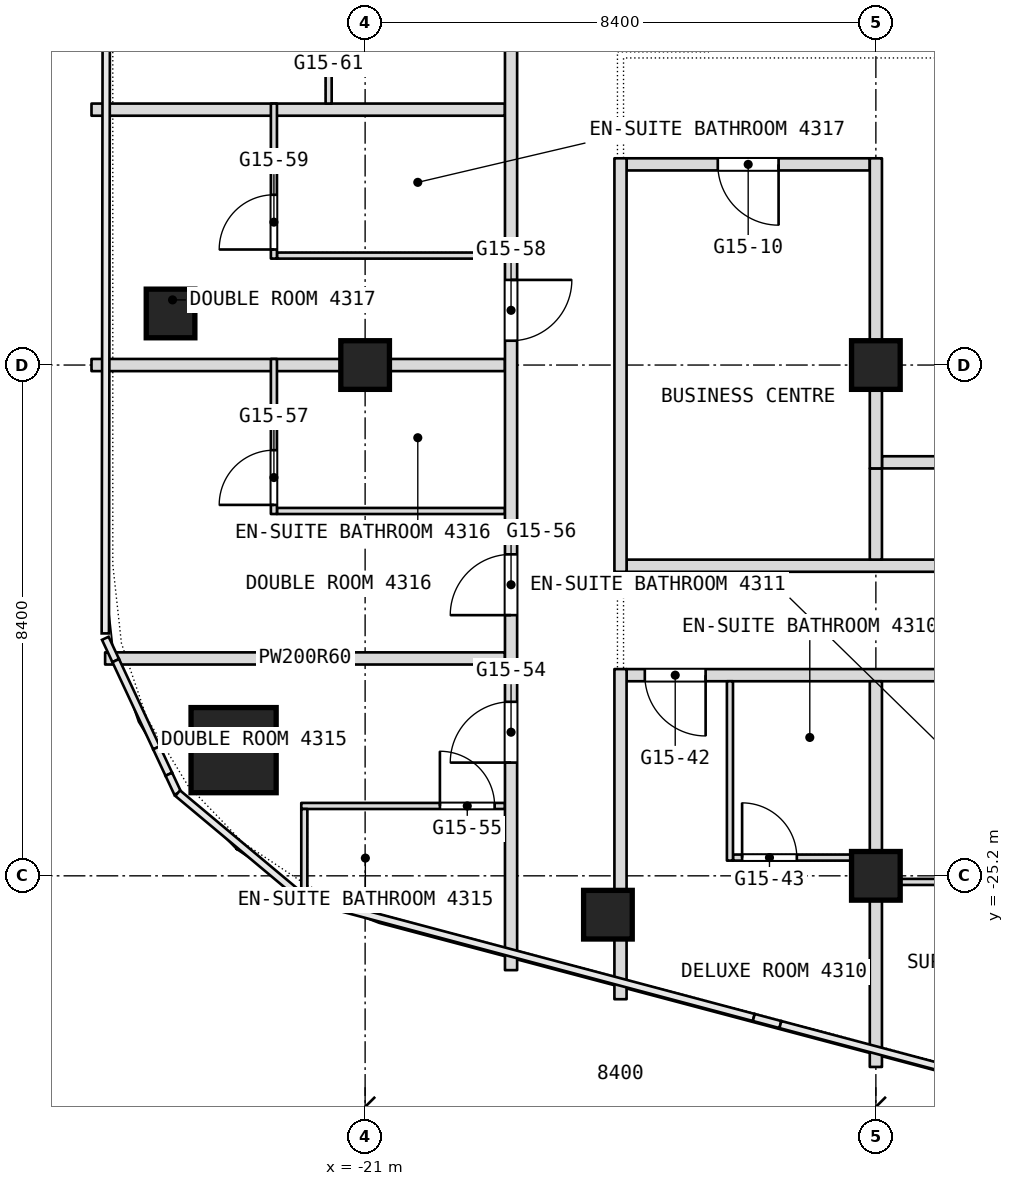
"""IFC4 building model, lengths in metres.
Left out: names, types, materials, properties, quantities, classifications, styles, units other than length and angle.
Written with IfcOpenShell. Run it as: python <this file> out.ifc"""

import sys

from ifc_helpers import new_model, si_unit, direction, frame, frame_2d, origin, origin_2d, place, context, subcontext, project, spatial, rectangle, extrude, element, fill, save


model = new_model("IFC4")
c1 = context("Model", 3, precision=1e-05, world=origin(), true_north=direction((0.0, 1.0)))
c2 = subcontext(c1, "Body", "Model", "MODEL_VIEW")
j1 = project(units=[si_unit("LENGTHUNIT", "METRE"), si_unit("PLANEANGLEUNIT", "RADIAN")], contexts=[c1])
p1 = place(None, origin())
s1 = spatial("IfcSite", under=j1, at=p1, CompositionType="ELEMENT")
p2 = place(p1, origin())
s2 = spatial("IfcBuilding", under=s1, at=p2, CompositionType="ELEMENT")
p3 = place(p2, frame((0.0, 0.0, 191.3)))
s3 = spatial("IfcBuildingStorey", under=s2, at=p3, CompositionType="ELEMENT", Elevation=191.3)
p4 = place(p3, frame((-23.163, -23.133, 0.0), z_axis=(0.0, 0.0, 1.0), x_axis=(1.0, 0.0, 0.0)))
e1 = element("IfcColumn", 1, at=p4, inside=s3, PredefinedType="COLUMN", context=c2, shape_type="SweptSolid", body=[
    extrude(rectangle(XDim=1.4, YDim=1.4, at=origin_2d()), origin(), (0.0, 0.0, 1.0), 3.6),
])
for number, where, z_axis, x_axis in (
    (2, (-21.0, -16.8, 0.0), (0.0, 0.0, 1.0), (1.0, 0.0, 0.0)),
    (3, (-12.6, -25.2, 0.0), (0.0, 0.0, 1.0), (1.0, 0.0, 0.0)),
    (4, (-12.6, -16.8, 0.0), (0.0, 0.0, 1.0), (1.0, 0.0, 0.0)),
    (5, (-24.2, -15.952, 0.0), (0.0, 0.0, 1.0), (1.0, 0.0, 0.0)),
    (6, (-17.007, -25.839, 0.0), (0.0, 0.0, 1.0), (1.0, 0.0, 0.0)),
):
    element("IfcColumn", number, at=place(p3, frame(where, z_axis=z_axis, x_axis=x_axis)), inside=s3, PredefinedType="COLUMN", context=c2, shape_type="SweptSolid", body=[
        extrude(rectangle(XDim=0.8, YDim=0.8, at=origin_2d()), origin(), (0.0, 0.0, 1.0), 3.6),
    ])
p5 = place(p3, frame((-12.5, -25.3, 0.0), z_axis=(0.0, 0.0, 1.0), x_axis=(1.0, 0.0, 0.0)))
e7 = element("IfcWall", 7, at=p5, inside=s3, PredefinedType="PARTITIONING", context=c2, shape_type="SweptSolid", body=[
    extrude(rectangle(XDim=2.35, YDim=0.1, at=frame_2d((1.175, 0.0))), origin(), (0.0, 0.0, 1.0), 2.94),
])
p6 = place(p5, frame((1.3, 0.0, 0.0)))
e8 = element("IfcOpeningElement", 8, at=p6, cuts=e7, PredefinedType="OPENING", context=c2, shape_type="SweptSolid", body=[
    extrude(rectangle(XDim=0.9, YDim=2.1, at=frame_2d((0.45, 1.05))), frame((0.0, 0.05, 0.0), z_axis=(0.0, -1.0, 0.0), x_axis=(1.0, 0.0, 0.0)), (0.0, 0.0, 1.0), 0.1),
])
p7 = place(p3, frame((-14.95, -24.9, 0.0), z_axis=(0.0, 0.0, 1.0), x_axis=(1.0, 0.0, 0.0)))
e9 = element("IfcWall", 9, at=p7, inside=s3, PredefinedType="PARTITIONING", context=c2, shape_type="SweptSolid", body=[
    extrude(rectangle(XDim=2.45, YDim=0.1, at=frame_2d((1.225, 0.0))), origin(), (0.0, 0.0, 1.0), 3.34),
])
p8 = place(p7, frame((0.15, 0.0, 0.0)))
e10 = element("IfcOpeningElement", 10, at=p8, cuts=e9, PredefinedType="OPENING", context=c2, shape_type="SweptSolid", body=[
    extrude(rectangle(XDim=0.9, YDim=2.1, at=frame_2d((0.45, 1.05))), frame((0.0, 0.05, 0.0), z_axis=(0.0, -1.0, 0.0), x_axis=(1.0, 0.0, 0.0)), (0.0, 0.0, 1.0), 0.1),
])
p9 = place(p3, frame((-22.05, -24.051, 0.0), z_axis=(0.0, 0.0, 1.0), x_axis=(1.0, 0.0, 0.0)))
e11 = element("IfcWall", 11, at=p9, inside=s3, PredefinedType="PARTITIONING", context=c2, shape_type="SweptSolid", body=[
    extrude(rectangle(XDim=3.35, YDim=0.1, at=frame_2d((1.675, 0.0))), origin(), (0.0, 0.0, 1.0), 3.34),
])
p10 = place(p9, frame((2.28, 0.0, 0.0)))
e12 = element("IfcOpeningElement", 12, at=p10, cuts=e11, PredefinedType="OPENING", context=c2, shape_type="SweptSolid", body=[
    extrude(rectangle(XDim=0.9, YDim=2.1, at=frame_2d((0.45, 1.05))), frame((0.0, 0.05, 0.0), z_axis=(0.0, -1.0, 0.0), x_axis=(1.0, 0.0, 0.0)), (0.0, 0.0, 1.0), 0.1),
])
p11 = place(p3, frame((-16.7, -21.9, 0.0), z_axis=(0.0, 0.0, 1.0), x_axis=(1.0, 0.0, 0.0)))
e13 = element("IfcWall", 13, at=p11, inside=s3, PredefinedType="PARTITIONING", context=c2, shape_type="SweptSolid", body=[
    extrude(rectangle(XDim=33.4, YDim=0.2, at=frame_2d((16.7, 0.0))), origin(), (0.0, 0.0, 1.0), 3.34),
])
p12 = place(p11, frame((0.3, 0.0, 0.0)))
e14 = element("IfcOpeningElement", 14, at=p12, cuts=e13, PredefinedType="OPENING", context=c2, shape_type="SweptSolid", body=[
    extrude(rectangle(XDim=1.0, YDim=2.1, at=frame_2d((0.5, 1.05))), frame((0.0, 0.1, 0.0), z_axis=(0.0, -1.0, 0.0), x_axis=(1.0, 0.0, 0.0)), (0.0, 0.0, 1.0), 0.2),
])
p13 = place(p11, frame((6.9, 0.0, 0.0)))
e15 = element("IfcOpeningElement", 15, at=p13, cuts=e13, PredefinedType="OPENING", context=c2, shape_type="SweptSolid", body=[
    extrude(rectangle(XDim=1.0, YDim=2.1, at=frame_2d((0.5, 1.05))), frame((0.0, 0.1, 0.0), z_axis=(0.0, -1.0, 0.0), x_axis=(1.0, 0.0, 0.0)), (0.0, 0.0, 1.0), 0.2),
])
p14 = place(p11, frame((8.7, 0.0, 0.0)))
e16 = element("IfcOpeningElement", 16, at=p14, cuts=e13, PredefinedType="OPENING", context=c2, shape_type="SweptSolid", body=[
    extrude(rectangle(XDim=1.0, YDim=2.1, at=frame_2d((0.5, 1.05))), frame((0.0, 0.1, 0.0), z_axis=(0.0, -1.0, 0.0), x_axis=(1.0, 0.0, 0.0)), (0.0, 0.0, 1.0), 0.2),
])
p15 = place(p11, frame((15.8, 0.0, 0.0)))
e17 = element("IfcOpeningElement", 17, at=p15, cuts=e13, PredefinedType="OPENING", context=c2, shape_type="SweptSolid", body=[
    extrude(rectangle(XDim=1.8, YDim=2.1, at=frame_2d((0.9, 1.05))), frame((0.0, 0.1, 0.0), z_axis=(0.0, -1.0, 0.0), x_axis=(1.0, 0.0, 0.0)), (0.0, 0.0, 1.0), 0.2),
])
p16 = place(p11, frame((26.65, 0.0, 0.0)))
e18 = element("IfcOpeningElement", 18, at=p16, cuts=e13, PredefinedType="OPENING", context=c2, shape_type="SweptSolid", body=[
    extrude(rectangle(XDim=1.1, YDim=2.1, at=frame_2d((0.55, 1.05))), frame((0.0, 0.1, 0.0), z_axis=(0.0, -1.0, 0.0), x_axis=(1.0, 0.0, 0.0)), (0.0, 0.0, 1.0), 0.2),
])
p17 = place(p11, frame((29.7, 0.0, 0.0)))
e19 = element("IfcOpeningElement", 19, at=p17, cuts=e13, PredefinedType="OPENING", context=c2, shape_type="SweptSolid", body=[
    extrude(rectangle(XDim=1.0, YDim=2.1, at=frame_2d((0.5, 1.05))), frame((0.0, 0.1, 0.0), z_axis=(0.0, -1.0, 0.0), x_axis=(1.0, 0.0, 0.0)), (0.0, 0.0, 1.0), 0.2),
])
p18 = place(p3, frame((-25.276, -21.625, 0.0), z_axis=(0.0, 0.0, 1.0), x_axis=(1.0, 0.0, 0.0)))
e20 = element("IfcWall", 20, at=p18, inside=s3, PredefinedType="PARTITIONING", context=c2, shape_type="SweptSolid", body=[
    extrude(rectangle(XDim=6.576, YDim=0.2, at=frame_2d((3.288, 0.0))), origin(), (0.0, 0.0, 1.0), 3.34),
])
p19 = place(p3, frame((-16.7, -20.1, 0.0), z_axis=(0.0, 0.0, 1.0), x_axis=(1.0, 0.0, 0.0)))
e21 = element("IfcWall", 21, at=p19, inside=s3, PredefinedType="PARTITIONING", context=c2, shape_type="SweptSolid", body=[
    extrude(rectangle(XDim=33.4, YDim=0.2, at=frame_2d((16.7, 0.0))), origin(), (0.0, 0.0, 1.0), 3.34),
])
p20 = place(p3, frame((-22.45, -19.2, 0.0), z_axis=(0.0, 0.0, 1.0), x_axis=(1.0, 0.0, 0.0)))
e22 = element("IfcWall", 22, at=p20, inside=s3, PredefinedType="PARTITIONING", context=c2, shape_type="SweptSolid", body=[
    extrude(rectangle(XDim=3.75, YDim=0.1, at=frame_2d((1.875, 0.0))), origin(), (0.0, 0.0, 1.0), 3.34),
])
p21 = place(p3, frame((-12.5, -18.4, 0.0), z_axis=(0.0, 0.0, 1.0), x_axis=(1.0, 0.0, 0.0)))
e23 = element("IfcWall", 23, at=p21, inside=s3, PredefinedType="PARTITIONING", context=c2, shape_type="SweptSolid", body=[
    extrude(rectangle(XDim=6.6, YDim=0.2, at=frame_2d((3.3, 0.0))), origin(), (0.0, 0.0, 1.0), 3.34),
])
p22 = place(p21, frame((1.5, 0.0, 0.0)))
e24 = element("IfcOpeningElement", 24, at=p22, cuts=e23, PredefinedType="OPENING", context=c2, shape_type="SweptSolid", body=[
    extrude(rectangle(XDim=1.0, YDim=2.1, at=frame_2d((0.5, 1.05))), frame((0.0, 0.1, 0.0), z_axis=(0.0, -1.0, 0.0), x_axis=(1.0, 0.0, 0.0)), (0.0, 0.0, 1.0), 0.2),
])
p23 = place(p3, frame((-25.5, -16.8, 0.0), z_axis=(0.0, 0.0, 1.0), x_axis=(1.0, 0.0, 0.0)))
e25 = element("IfcWall", 25, at=p23, inside=s3, PredefinedType="PARTITIONING", context=c2, shape_type="SweptSolid", body=[
    extrude(rectangle(XDim=6.8, YDim=0.2, at=frame_2d((3.4, 0.0))), origin(), (0.0, 0.0, 1.0), 2.94),
])
p24 = place(p3, frame((-22.45, -15.0, 0.0), z_axis=(0.0, 0.0, 1.0), x_axis=(1.0, 0.0, 0.0)))
e26 = element("IfcWall", 26, at=p24, inside=s3, PredefinedType="PARTITIONING", context=c2, shape_type="SweptSolid", body=[
    extrude(rectangle(XDim=3.75, YDim=0.1, at=frame_2d((1.875, 0.0))), origin(), (0.0, 0.0, 1.0), 3.34),
])
p25 = place(p3, frame((-16.7, -13.5, 0.0), z_axis=(0.0, 0.0, 1.0), x_axis=(1.0, 0.0, 0.0)))
e27 = element("IfcWall", 27, at=p25, inside=s3, PredefinedType="PARTITIONING", context=c2, shape_type="SweptSolid", body=[
    extrude(rectangle(XDim=4.0, YDim=0.2, at=frame_2d((2.0, 0.0))), origin(), (0.0, 0.0, 1.0), 3.34),
])
p26 = place(p25, frame((1.5, 0.0, 0.0)))
e28 = element("IfcOpeningElement", 28, at=p26, cuts=e27, PredefinedType="OPENING", context=c2, shape_type="SweptSolid", body=[
    extrude(rectangle(XDim=1.0, YDim=2.1, at=frame_2d((0.5, 1.05))), frame((0.0, 0.1, 0.0), z_axis=(0.0, -1.0, 0.0), x_axis=(1.0, 0.0, 0.0)), (0.0, 0.0, 1.0), 0.2),
])
p27 = place(p3, frame((-25.5, -12.6, 0.0), z_axis=(0.0, 0.0, 1.0), x_axis=(1.0, 0.0, 0.0)))
e29 = element("IfcWall", 29, at=p27, inside=s3, PredefinedType="PARTITIONING", context=c2, shape_type="SweptSolid", body=[
    extrude(rectangle(XDim=6.8, YDim=0.2, at=frame_2d((3.4, 0.0))), origin(), (0.0, 0.0, 1.0), 3.34),
])
p28 = place(p3, frame((-12.6, -28.343, 0.0), z_axis=(0.0, 0.0, 1.0), x_axis=(0.0, 1.0, 0.0)))
e30 = element("IfcWall", 30, at=p28, inside=s3, PredefinedType="PARTITIONING", context=c2, shape_type="SweptSolid", body=[
    extrude(rectangle(XDim=6.343, YDim=0.2, at=frame_2d((3.171, 0.0))), origin(), (0.0, 0.0, 1.0), 3.34),
])
p29 = place(p3, frame((-12.6, -20.0, 0.0), z_axis=(0.0, 0.0, 1.0), x_axis=(0.0, 1.0, 0.0)))
e31 = element("IfcWall", 31, at=p29, inside=s3, PredefinedType="PARTITIONING", context=c2, shape_type="SweptSolid", body=[
    extrude(rectangle(XDim=1.5, YDim=0.2, at=frame_2d((0.75, 0.0))), origin(), (0.0, 0.0, 1.0), 3.34),
])
p30 = place(p3, frame((-12.6, -18.5, 0.0), z_axis=(0.0, 0.0, 1.0), x_axis=(0.0, 1.0, 0.0)))
e32 = element("IfcWall", 32, at=p30, inside=s3, PredefinedType="PARTITIONING", context=c2, shape_type="SweptSolid", body=[
    extrude(rectangle(XDim=5.1, YDim=0.2, at=frame_2d((2.55, 0.0))), origin(), (0.0, 0.0, 1.0), 3.34),
])
p31 = place(p3, frame((-15.0, -24.95, 0.0), z_axis=(0.0, 0.0, 1.0), x_axis=(0.0, 1.0, 0.0)))
e33 = element("IfcWall", 33, at=p31, inside=s3, PredefinedType="PARTITIONING", context=c2, shape_type="SweptSolid", body=[
    extrude(rectangle(XDim=2.95, YDim=0.1, at=frame_2d((1.475, 0.0))), origin(), (0.0, 0.0, 1.0), 3.34),
])
p32 = place(p3, frame((-16.8, -27.229, 0.0), z_axis=(0.0, 0.0, 1.0), x_axis=(0.0, 1.0, 0.0)))
e34 = element("IfcWall", 34, at=p32, inside=s3, PredefinedType="PARTITIONING", context=c2, shape_type="SweptSolid", body=[
    extrude(rectangle(XDim=5.429, YDim=0.2, at=frame_2d((2.714, 0.0))), origin(), (0.0, 0.0, 1.0), 3.34),
])
p33 = place(p3, frame((-16.8, -20.2, 0.0), z_axis=(0.0, 0.0, 1.0), x_axis=(0.0, 1.0, 0.0)))
e35 = element("IfcWall", 35, at=p33, inside=s3, PredefinedType="PARTITIONING", context=c2, shape_type="SweptSolid", body=[
    extrude(rectangle(XDim=6.8, YDim=0.2, at=frame_2d((3.4, 0.0))), origin(), (0.0, 0.0, 1.0), 3.34),
])
p34 = place(p3, frame((-18.6, -26.751, 0.0), z_axis=(0.0, 0.0, 1.0), x_axis=(0.0, 1.0, 0.0)))
e36 = element("IfcWall", 36, at=p34, inside=s3, PredefinedType="PARTITIONING", context=c2, shape_type="SweptSolid", body=[
    extrude(rectangle(XDim=49.091, YDim=0.2, at=frame_2d((24.545, 0.0))), origin(), (0.0, 0.0, 1.0), 3.34),
])
p35 = place(p34, frame((3.413, 0.0, 0.0)))
e37 = element("IfcOpeningElement", 37, at=p35, cuts=e36, PredefinedType="OPENING", context=c2, shape_type="SweptSolid", body=[
    extrude(rectangle(XDim=1.0, YDim=2.1, at=frame_2d((0.5, 1.05))), frame((0.0, 0.1, 0.0), z_axis=(0.0, -1.0, 0.0), x_axis=(1.0, 0.0, 0.0)), (0.0, 0.0, 1.0), 0.2),
])
p36 = place(p34, frame((5.838, 0.0, 0.0)))
e38 = element("IfcOpeningElement", 38, at=p36, cuts=e36, PredefinedType="OPENING", context=c2, shape_type="SweptSolid", body=[
    extrude(rectangle(XDim=1.0, YDim=2.1, at=frame_2d((0.5, 1.05))), frame((0.0, 0.1, 0.0), z_axis=(0.0, -1.0, 0.0), x_axis=(1.0, 0.0, 0.0)), (0.0, 0.0, 1.0), 0.2),
])
p37 = place(p34, frame((10.351, 0.0, 0.0)))
e39 = element("IfcOpeningElement", 39, at=p37, cuts=e36, PredefinedType="OPENING", context=c2, shape_type="SweptSolid", body=[
    extrude(rectangle(XDim=1.0, YDim=2.1, at=frame_2d((0.5, 1.05))), frame((0.0, 0.1, 0.0), z_axis=(0.0, -1.0, 0.0), x_axis=(1.0, 0.0, 0.0)), (0.0, 0.0, 1.0), 0.2),
])
p38 = place(p34, frame((16.951, 0.0, 0.0)))
e40 = element("IfcOpeningElement", 40, at=p38, cuts=e36, PredefinedType="OPENING", context=c2, shape_type="SweptSolid", body=[
    extrude(rectangle(XDim=1.0, YDim=2.1, at=frame_2d((0.5, 1.05))), frame((0.0, 0.1, 0.0), z_axis=(0.0, -1.0, 0.0), x_axis=(1.0, 0.0, 0.0)), (0.0, 0.0, 1.0), 0.2),
])
p39 = place(p34, frame((21.151, 0.0, 0.0)))
e41 = element("IfcOpeningElement", 41, at=p39, cuts=e36, PredefinedType="OPENING", context=c2, shape_type="SweptSolid", body=[
    extrude(rectangle(XDim=1.0, YDim=2.1, at=frame_2d((0.5, 1.05))), frame((0.0, 0.1, 0.0), z_axis=(0.0, -1.0, 0.0), x_axis=(1.0, 0.0, 0.0)), (0.0, 0.0, 1.0), 0.2),
])
p40 = place(p34, frame((22.951, 0.0, 0.0)))
e42 = element("IfcOpeningElement", 42, at=p40, cuts=e36, PredefinedType="OPENING", context=c2, shape_type="SweptSolid", body=[
    extrude(rectangle(XDim=1.0, YDim=2.1, at=frame_2d((0.5, 1.05))), frame((0.0, 0.1, 0.0), z_axis=(0.0, -1.0, 0.0), x_axis=(1.0, 0.0, 0.0)), (0.0, 0.0, 1.0), 0.2),
])
p41 = place(p34, frame((27.151, 0.0, 0.0)))
e43 = element("IfcOpeningElement", 43, at=p41, cuts=e36, PredefinedType="OPENING", context=c2, shape_type="SweptSolid", body=[
    extrude(rectangle(XDim=1.0, YDim=2.1, at=frame_2d((0.5, 1.05))), frame((0.0, 0.1, 0.0), z_axis=(0.0, -1.0, 0.0), x_axis=(1.0, 0.0, 0.0)), (0.0, 0.0, 1.0), 0.2),
])
p42 = place(p34, frame((33.751, 0.0, 0.0)))
e44 = element("IfcOpeningElement", 44, at=p42, cuts=e36, PredefinedType="OPENING", context=c2, shape_type="SweptSolid", body=[
    extrude(rectangle(XDim=1.0, YDim=2.1, at=frame_2d((0.5, 1.05))), frame((0.0, 0.1, 0.0), z_axis=(0.0, -1.0, 0.0), x_axis=(1.0, 0.0, 0.0)), (0.0, 0.0, 1.0), 0.2),
])
p43 = place(p34, frame((37.951, 0.0, 0.0)))
e45 = element("IfcOpeningElement", 45, at=p43, cuts=e36, PredefinedType="OPENING", context=c2, shape_type="SweptSolid", body=[
    extrude(rectangle(XDim=1.0, YDim=2.1, at=frame_2d((0.5, 1.05))), frame((0.0, 0.1, 0.0), z_axis=(0.0, -1.0, 0.0), x_axis=(1.0, 0.0, 0.0)), (0.0, 0.0, 1.0), 0.2),
])
p44 = place(p34, frame((39.751, 0.0, 0.0)))
e46 = element("IfcOpeningElement", 46, at=p44, cuts=e36, PredefinedType="OPENING", context=c2, shape_type="SweptSolid", body=[
    extrude(rectangle(XDim=1.0, YDim=2.1, at=frame_2d((0.5, 1.05))), frame((0.0, 0.1, 0.0), z_axis=(0.0, -1.0, 0.0), x_axis=(1.0, 0.0, 0.0)), (0.0, 0.0, 1.0), 0.2),
])
p45 = place(p34, frame((44.051, 0.0, 0.0)))
e47 = element("IfcOpeningElement", 47, at=p45, cuts=e36, PredefinedType="OPENING", context=c2, shape_type="SweptSolid", body=[
    extrude(rectangle(XDim=1.0, YDim=2.1, at=frame_2d((0.5, 1.05))), frame((0.0, 0.1, 0.0), z_axis=(0.0, -1.0, 0.0), x_axis=(1.0, 0.0, 0.0)), (0.0, 0.0, 1.0), 0.2),
])
p46 = place(p3, frame((-21.6, -12.5, 0.0), z_axis=(0.0, 0.0, 1.0), x_axis=(0.0, 1.0, 0.0)))
e48 = element("IfcWall", 48, at=p46, inside=s3, PredefinedType="PARTITIONING", context=c2, shape_type="SweptSolid", body=[
    extrude(rectangle(XDim=2.25, YDim=0.1, at=frame_2d((1.125, 0.0))), origin(), (0.0, 0.0, 1.0), 3.34),
])
p47 = place(p46, frame((1.2, 0.0, 0.0)))
e49 = element("IfcOpeningElement", 49, at=p47, cuts=e48, PredefinedType="OPENING", context=c2, shape_type="SweptSolid", body=[
    extrude(rectangle(XDim=0.9, YDim=2.1, at=frame_2d((0.45, 1.05))), frame((0.0, 0.05, 0.0), z_axis=(0.0, -1.0, 0.0), x_axis=(1.0, 0.0, 0.0)), (0.0, 0.0, 1.0), 0.1),
])
p48 = place(p3, frame((-22.0, -25.685, 0.0), z_axis=(0.0, 0.0, 1.0), x_axis=(0.0, 1.0, 0.0)))
e50 = element("IfcWall", 50, at=p48, inside=s3, PredefinedType="PARTITIONING", context=c2, shape_type="SweptSolid", body=[
    extrude(rectangle(XDim=1.584, YDim=0.1, at=frame_2d((0.792, 0.0))), origin(), (0.0, 0.0, 1.0), 3.34),
])
p49 = place(p3, frame((-22.5, -19.25, 0.0), z_axis=(0.0, 0.0, 1.0), x_axis=(0.0, 1.0, 0.0)))
e51 = element("IfcWall", 51, at=p49, inside=s3, PredefinedType="PARTITIONING", context=c2, shape_type="SweptSolid", body=[
    extrude(rectangle(XDim=2.55, YDim=0.1, at=frame_2d((1.275, 0.0))), origin(), (0.0, 0.0, 1.0), 3.34),
])
p50 = place(p49, frame((0.15, 0.0, 0.0)))
e52 = element("IfcOpeningElement", 52, at=p50, cuts=e51, PredefinedType="OPENING", context=c2, shape_type="SweptSolid", body=[
    extrude(rectangle(XDim=0.9, YDim=2.1, at=frame_2d((0.45, 1.05))), frame((0.0, 0.05, 0.0), z_axis=(0.0, -1.0, 0.0), x_axis=(1.0, 0.0, 0.0)), (0.0, 0.0, 1.0), 0.1),
])
p51 = place(p3, frame((-22.5, -15.05, 0.0), z_axis=(0.0, 0.0, 1.0), x_axis=(0.0, 1.0, 0.0)))
e53 = element("IfcWall", 53, at=p51, inside=s3, PredefinedType="PARTITIONING", context=c2, shape_type="SweptSolid", body=[
    extrude(rectangle(XDim=2.55, YDim=0.1, at=frame_2d((1.275, 0.0))), origin(), (0.0, 0.0, 1.0), 3.34),
])
p52 = place(p51, frame((0.15, 0.0, 0.0)))
e54 = element("IfcOpeningElement", 54, at=p52, cuts=e53, PredefinedType="OPENING", context=c2, shape_type="SweptSolid", body=[
    extrude(rectangle(XDim=0.9, YDim=2.1, at=frame_2d((0.45, 1.05))), frame((0.0, 0.05, 0.0), z_axis=(0.0, -1.0, 0.0), x_axis=(1.0, 0.0, 0.0)), (0.0, 0.0, 1.0), 0.1),
])
p53 = place(p8, origin())
e55 = element("IfcDoor", 55, at=p53, inside=s3, OperationType="SINGLE_SWING_LEFT", PredefinedType="DOOR", context=c2, shape_type="SweptSolid", body=[
    extrude(rectangle(XDim=0.9, YDim=2.1, at=frame_2d((0.45, 1.05))), frame((0.0, 0.025, 0.0), z_axis=(0.0, -1.0, 0.0), x_axis=(1.0, 0.0, 0.0)), (0.0, 0.0, 1.0), 0.05),
])
fill(e10, e55)
p54 = place(p10, origin())
e56 = element("IfcDoor", 56, at=p54, inside=s3, OperationType="SINGLE_SWING_LEFT", PredefinedType="DOOR", context=c2, shape_type="SweptSolid", body=[
    extrude(rectangle(XDim=0.9, YDim=2.1, at=frame_2d((0.45, 1.05))), frame((0.0, 0.025, 0.0), z_axis=(0.0, -1.0, 0.0), x_axis=(1.0, 0.0, 0.0)), (0.0, 0.0, 1.0), 0.05),
])
fill(e12, e56)
p55 = place(p12, origin())
e57 = element("IfcDoor", 57, at=p55, inside=s3, OperationType="SINGLE_SWING_RIGHT", PredefinedType="DOOR", context=c2, shape_type="SweptSolid", body=[
    extrude(rectangle(XDim=1.0, YDim=2.1, at=frame_2d((0.5, 1.05))), frame((0.0, 0.025, 0.0), z_axis=(0.0, -1.0, 0.0), x_axis=(1.0, 0.0, 0.0)), (0.0, 0.0, 1.0), 0.05),
])
fill(e14, e57)
p56 = place(p26, origin())
e58 = element("IfcDoor", 58, at=p56, inside=s3, OperationType="SINGLE_SWING_RIGHT", PredefinedType="DOOR", context=c2, shape_type="SweptSolid", body=[
    extrude(rectangle(XDim=1.0, YDim=2.1, at=frame_2d((0.5, 1.05))), frame((0.0, 0.025, 0.0), z_axis=(0.0, -1.0, 0.0), x_axis=(1.0, 0.0, 0.0)), (0.0, 0.0, 1.0), 0.05),
])
fill(e28, e58)
p57 = place(p35, origin())
e59 = element("IfcDoor", 59, at=p57, inside=s3, OperationType="SINGLE_SWING_LEFT", PredefinedType="DOOR", context=c2, shape_type="SweptSolid", body=[
    extrude(rectangle(XDim=1.0, YDim=2.1, at=frame_2d((0.5, 1.05))), frame((0.0, 0.025, 0.0), z_axis=(0.0, -1.0, 0.0), x_axis=(1.0, 0.0, 0.0)), (0.0, 0.0, 1.0), 0.05),
])
fill(e37, e59)
p58 = place(p36, origin())
e60 = element("IfcDoor", 60, at=p58, inside=s3, OperationType="SINGLE_SWING_LEFT", PredefinedType="DOOR", context=c2, shape_type="SweptSolid", body=[
    extrude(rectangle(XDim=1.0, YDim=2.1, at=frame_2d((0.5, 1.05))), frame((0.0, 0.025, 0.0), z_axis=(0.0, -1.0, 0.0), x_axis=(1.0, 0.0, 0.0)), (0.0, 0.0, 1.0), 0.05),
])
fill(e38, e60)
p59 = place(p37, origin())
e61 = element("IfcDoor", 61, at=p59, inside=s3, OperationType="SINGLE_SWING_LEFT", PredefinedType="DOOR", context=c2, shape_type="SweptSolid", body=[
    extrude(rectangle(XDim=1.0, YDim=2.1, at=frame_2d((0.5, 1.05))), frame((0.0, 0.025, 0.0), z_axis=(0.0, -1.0, 0.0), x_axis=(1.0, 0.0, 0.0)), (0.0, 0.0, 1.0), 0.05),
])
fill(e39, e61)
p60 = place(p50, origin())
e62 = element("IfcDoor", 62, at=p60, inside=s3, OperationType="SINGLE_SWING_RIGHT", PredefinedType="DOOR", context=c2, shape_type="SweptSolid", body=[
    extrude(rectangle(XDim=0.9, YDim=2.1, at=frame_2d((0.45, 1.05))), frame((0.0, 0.025, 0.0), z_axis=(0.0, -1.0, 0.0), x_axis=(1.0, 0.0, 0.0)), (0.0, 0.0, 1.0), 0.05),
])
fill(e52, e62)
p61 = place(p52, origin())
e63 = element("IfcDoor", 63, at=p61, inside=s3, OperationType="SINGLE_SWING_RIGHT", PredefinedType="DOOR", context=c2, shape_type="SweptSolid", body=[
    extrude(rectangle(XDim=0.9, YDim=2.1, at=frame_2d((0.45, 1.05))), frame((0.0, 0.025, 0.0), z_axis=(0.0, -1.0, 0.0), x_axis=(1.0, 0.0, 0.0)), (0.0, 0.0, 1.0), 0.05),
])
fill(e54, e63)
save(model, sys.argv[1])
